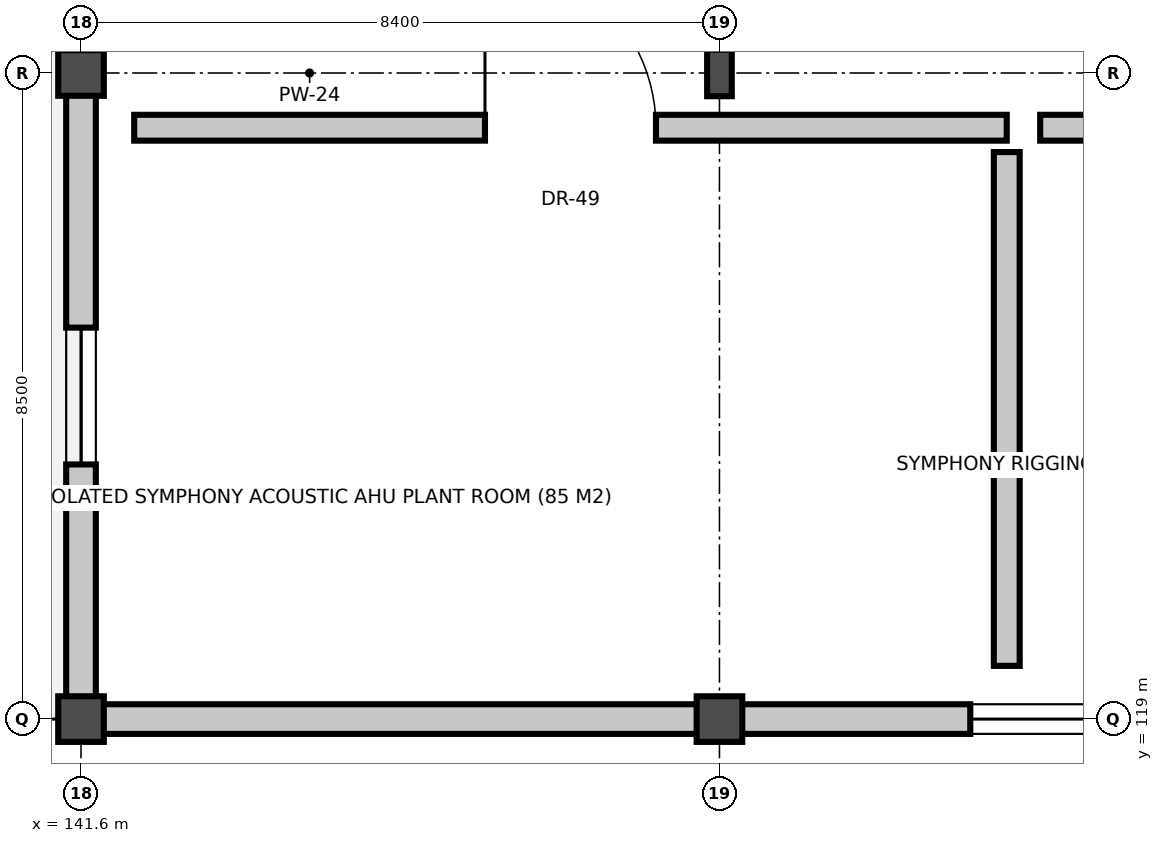
"""IFC4 building model, lengths in metres.
Left out: names, types, materials, properties, quantities, classifications, styles, units other than length and angle.
Written with IfcOpenShell. Run it as: python <this file> out.ifc"""

import sys

from ifc_helpers import new_model, si_unit, direction, frame, frame_2d, origin, origin_2d, place, context, subcontext, project, spatial, rectangle, i_section, extrude, element, fill, save


model = new_model("IFC4")
c1 = context("Model", 3, precision=1e-05, world=origin(), true_north=direction((0.0, 1.0)))
c2 = subcontext(c1, "Body", "Model", "MODEL_VIEW")
j1 = project(units=[si_unit("LENGTHUNIT", "METRE"), si_unit("PLANEANGLEUNIT", "RADIAN")], contexts=[c1])
p1 = place(None, origin())
s1 = spatial("IfcSite", under=j1, at=p1, CompositionType="ELEMENT")
p2 = place(p1, origin())
s2 = spatial("IfcBuilding", under=s1, at=p2, CompositionType="ELEMENT")
p3 = place(p2, frame((0.0, 0.0, 23.7)))
s3 = spatial("IfcBuildingStorey", under=s2, at=p3, CompositionType="ELEMENT", Elevation=23.7)
for number, where, z_axis, x_axis in (
    (1, (141.6, 119.0, 0.0), (0.0, 0.0, 1.0), (1.0, 0.0, 0.0)),
    (2, (141.6, 127.5, 0.0), (0.0, 0.0, 1.0), (1.0, 0.0, 0.0)),
    (3, (150.0, 119.0, 0.0), (0.0, 0.0, 1.0), (1.0, 0.0, 0.0)),
):
    element("IfcColumn", number, at=place(p3, frame(where, z_axis=z_axis, x_axis=x_axis)), inside=s3, PredefinedType="COLUMN", context=c2, shape_type="SweptSolid", body=[
        extrude(rectangle(XDim=0.6, YDim=0.6, at=origin_2d()), origin(), (0.0, 0.0, 1.0), 4.2),
    ])
p4 = place(p3, frame((150.0, 127.5, 0.0), z_axis=(0.0, 0.0, 1.0), x_axis=(1.0, 0.0, 0.0)))
e4 = element("IfcColumn", 4, at=p4, inside=s3, PredefinedType="COLUMN", context=c2, shape_type="SweptSolid", body=[
    extrude(i_section(OverallWidth=0.324, OverallDepth=0.611, WebThickness=0.013, FlangeThickness=0.019, at=origin_2d()), origin(), (0.0, 0.0, 1.0), 4.2),
])
p5 = place(p3, frame((149.72, 119.0, 0.0), z_axis=(0.0, 0.0, 1.0), x_axis=(-1.0, 0.0, 0.0)))
e5 = element("IfcWall", 5, at=p5, inside=s3, PredefinedType="SOLIDWALL", context=c2, shape_type="SweptSolid", body=[
    extrude(rectangle(XDim=7.84, YDim=0.39, at=frame_2d((3.92, 0.0))), origin(), (0.0, 0.0, 1.0), 3.024),
])
p6 = place(p3, frame((158.12, 119.0, 0.0), z_axis=(0.0, 0.0, 1.0), x_axis=(-1.0, 0.0, 0.0)))
e6 = element("IfcWall", 6, at=p6, inside=s3, PredefinedType="SOLIDWALL", context=c2, shape_type="SweptSolid", body=[
    extrude(rectangle(XDim=7.84, YDim=0.39, at=frame_2d((3.92, 0.0))), origin(), (0.0, 0.0, 1.0), 3.316),
])
p7 = place(p6, frame((3.02, 0.0, 1.1)))
e7 = element("IfcOpeningElement", 7, at=p7, cuts=e6, PredefinedType="OPENING", context=c2, shape_type="SweptSolid", body=[
    extrude(rectangle(XDim=1.8, YDim=1.4, at=frame_2d((0.9, 0.7))), frame((0.0, 0.205, 0.0), z_axis=(0.0, -1.0, 0.0), x_axis=(1.0, 0.0, 0.0)), (0.0, 0.0, 1.0), 0.41),
])
p8 = place(p3, frame((141.6, 119.28, 0.0), z_axis=(0.0, 0.0, 1.0), x_axis=(0.0, 1.0, 0.0)))
e8 = element("IfcWall", 8, at=p8, inside=s3, PredefinedType="SOLIDWALL", context=c2, shape_type="SweptSolid", body=[
    extrude(rectangle(XDim=7.94, YDim=0.39, at=frame_2d((3.97, 0.0))), origin(), (0.0, 0.0, 1.0), 3.231),
])
p9 = place(p8, frame((3.07, 0.0, 1.1)))
e9 = element("IfcOpeningElement", 9, at=p9, cuts=e8, PredefinedType="OPENING", context=c2, shape_type="SweptSolid", body=[
    extrude(rectangle(XDim=1.8, YDim=1.4, at=frame_2d((0.9, 0.7))), frame((0.0, 0.205, 0.0), z_axis=(0.0, -1.0, 0.0), x_axis=(1.0, 0.0, 0.0)), (0.0, 0.0, 1.0), 0.41),
])
p10 = place(p3, frame((142.3, 126.78, 0.0), z_axis=(0.0, 0.0, 1.0), x_axis=(1.0, 0.0, 0.0)))
e10 = element("IfcWall", 10, at=p10, inside=s3, PredefinedType="PARTITIONING", context=c2, shape_type="SweptSolid", body=[
    extrude(rectangle(XDim=11.48, YDim=0.34, at=frame_2d((5.74, 0.0))), origin(), (0.0, 0.0, 1.0), 2.86),
])
p11 = place(p10, frame((4.615, 0.0, 0.0)))
e11 = element("IfcOpeningElement", 11, at=p11, cuts=e10, PredefinedType="OPENING", context=c2, shape_type="SweptSolid", body=[
    extrude(rectangle(XDim=2.25, YDim=2.46, at=frame_2d((1.125, 1.23))), frame((0.0, 0.18, 0.0), z_axis=(0.0, -1.0, 0.0), x_axis=(1.0, 0.0, 0.0)), (0.0, 0.0, 1.0), 0.36),
])
p12 = place(p3, frame((153.78, 126.46, 0.0), z_axis=(0.0, 0.0, 1.0), x_axis=(0.0, -1.0, 0.0)))
e12 = element("IfcWall", 12, at=p12, inside=s3, PredefinedType="PARTITIONING", context=c2, shape_type="SweptSolid", body=[
    extrude(rectangle(XDim=6.76, YDim=0.34, at=frame_2d((3.38, 0.0))), origin(), (0.0, 0.0, 1.0), 2.86),
])
p13 = place(p3, frame((154.22, 126.78, 0.0), z_axis=(0.0, 0.0, 1.0), x_axis=(1.0, 0.0, 0.0)))
e13 = element("IfcWall", 13, at=p13, inside=s3, PredefinedType="PARTITIONING", context=c2, shape_type="SweptSolid", body=[
    extrude(rectangle(XDim=12.16, YDim=0.34, at=frame_2d((6.08, 0.0))), origin(), (0.0, 0.0, 1.0), 2.86),
])
p14 = place(p13, frame((5.18, 0.0, 0.0)))
e14 = element("IfcOpeningElement", 14, at=p14, cuts=e13, PredefinedType="OPENING", context=c2, shape_type="SweptSolid", body=[
    extrude(rectangle(XDim=1.8, YDim=2.34, at=frame_2d((0.9, 1.17))), frame((0.0, 0.18, 0.0), z_axis=(0.0, -1.0, 0.0), x_axis=(1.0, 0.0, 0.0)), (0.0, 0.0, 1.0), 0.36),
])
p15 = place(p7, origin())
e15 = element("IfcWindow", 15, at=p15, inside=s3, PartitioningType="SINGLE_PANEL", PredefinedType="WINDOW", context=c2, shape_type="SweptSolid", body=[
    extrude(rectangle(XDim=1.8, YDim=1.4, at=frame_2d((0.9, 0.7))), frame((0.0, 0.03, 0.0), z_axis=(0.0, -1.0, 0.0), x_axis=(1.0, 0.0, 0.0)), (0.0, 0.0, 1.0), 0.06),
])
fill(e7, e15)
p16 = place(p9, origin())
e16 = element("IfcWindow", 16, at=p16, inside=s3, PartitioningType="SINGLE_PANEL", PredefinedType="WINDOW", context=c2, shape_type="SweptSolid", body=[
    extrude(rectangle(XDim=1.8, YDim=1.4, at=frame_2d((0.9, 0.7))), frame((0.0, 0.03, 0.0), z_axis=(0.0, -1.0, 0.0), x_axis=(1.0, 0.0, 0.0)), (0.0, 0.0, 1.0), 0.06),
])
fill(e9, e16)
p17 = place(p11, origin())
e17 = element("IfcDoor", 17, at=p17, inside=s3, OperationType="SINGLE_SWING_LEFT", PredefinedType="DOOR", context=c2, shape_type="SweptSolid", body=[
    extrude(rectangle(XDim=2.25, YDim=2.46, at=frame_2d((1.125, 1.23))), frame((0.0, 0.025, 0.0), z_axis=(0.0, -1.0, 0.0), x_axis=(1.0, 0.0, 0.0)), (0.0, 0.0, 1.0), 0.05),
])
fill(e11, e17)
save(model, sys.argv[1])
